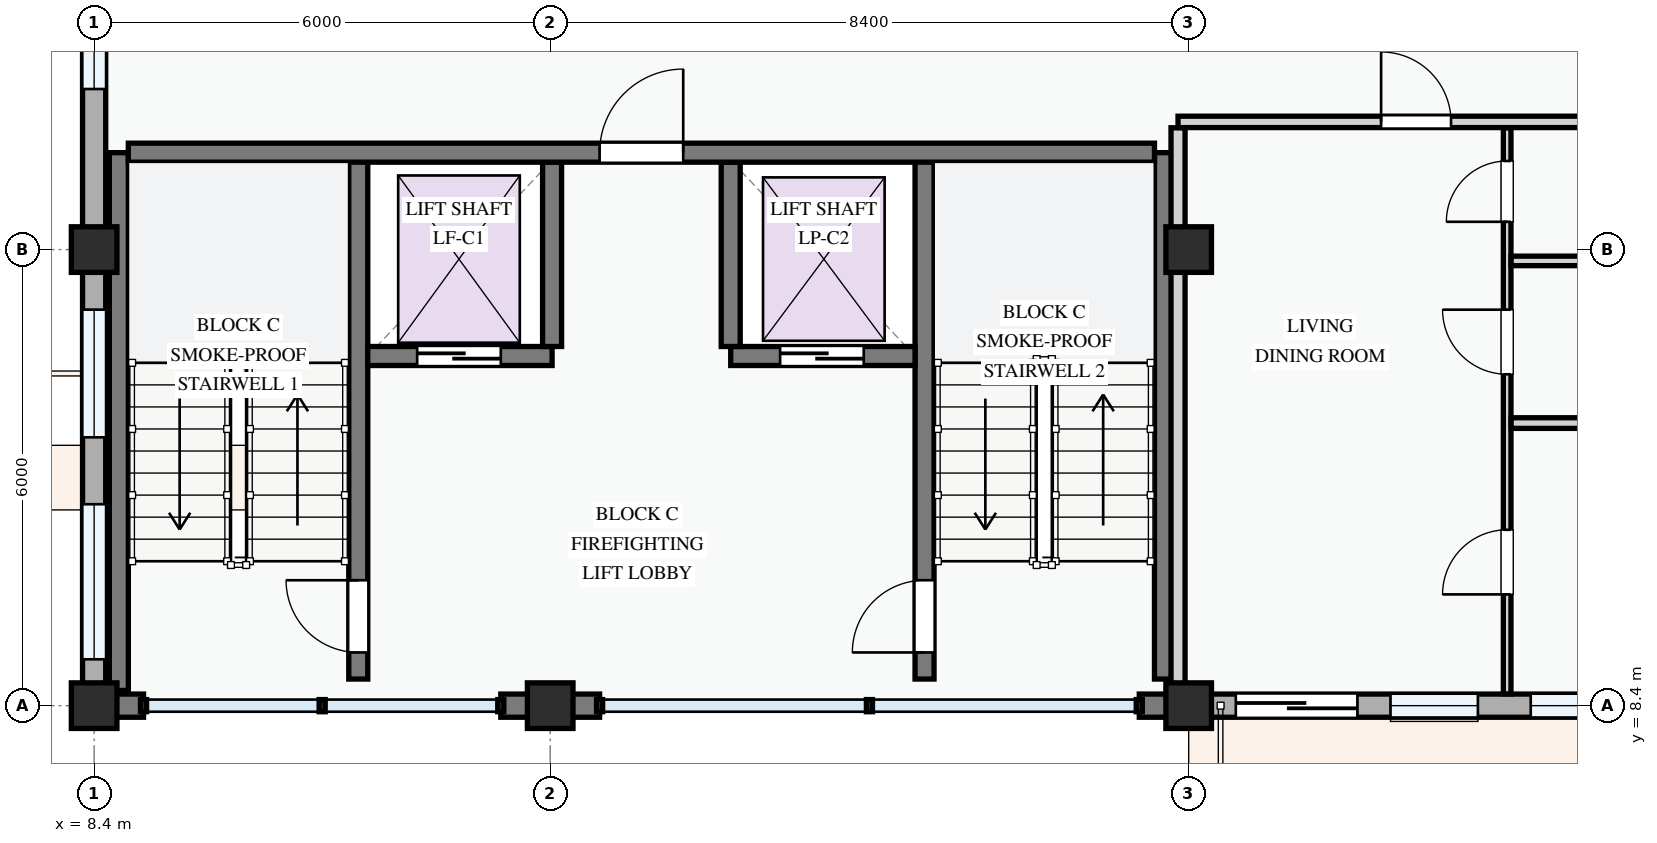
"""IFC4 building model, lengths in metres.
Left out: names, types, materials, properties, quantities, classifications, styles, units other than length and angle.
Written with IfcOpenShell. Run it as: python <this file> out.ifc"""

import sys

from ifc_helpers import new_model, si_unit, direction, frame, frame_2d, origin, origin_2d, place, context, subcontext, project, spatial, rectangle, extrude, element, fill, save


model = new_model("IFC4")
c1 = context("Model", 3, precision=1e-05, world=origin(), true_north=direction((0.0, 1.0)))
c2 = subcontext(c1, "Body", "Model", "MODEL_VIEW")
j1 = project(units=[si_unit("LENGTHUNIT", "METRE"), si_unit("PLANEANGLEUNIT", "RADIAN")], contexts=[c1])
p1 = place(None, origin())
s1 = spatial("IfcSite", under=j1, at=p1, CompositionType="ELEMENT")
p2 = place(p1, origin())
s2 = spatial("IfcBuilding", under=s1, at=p2, CompositionType="ELEMENT")
p3 = place(p2, frame((0.0, 0.0, 18.0)))
s3 = spatial("IfcBuildingStorey", under=s2, at=p3, CompositionType="ELEMENT", Elevation=18.0)
for number, where, z_axis, x_axis in (
    (1, (8.4, 8.4, 0.0), (0.0, 0.0, 1.0), (1.0, 0.0, 0.0)),
    (2, (8.4, 14.4, 0.0), (0.0, 0.0, 1.0), (1.0, 0.0, 0.0)),
    (3, (14.4, 8.4, 0.0), (0.0, 0.0, 1.0), (1.0, 0.0, 0.0)),
    (4, (22.8, 8.4, 0.0), (0.0, 0.0, 1.0), (1.0, 0.0, 0.0)),
    (5, (22.8, 14.4, 0.0), (0.0, 0.0, 1.0), (1.0, 0.0, 0.0)),
):
    element("IfcColumn", number, at=place(p3, frame(where, z_axis=z_axis, x_axis=x_axis)), inside=s3, PredefinedType="COLUMN", context=c2, shape_type="SweptSolid", body=[
        extrude(rectangle(XDim=0.6, YDim=0.6, at=origin_2d()), origin(), (0.0, 0.0, 1.0), 3.3),
    ])
p4 = place(p3, frame((8.4, 22.8, 0.0), z_axis=(0.0, 0.0, 1.0), x_axis=(0.0, -1.0, 0.0)))
e6 = element("IfcWall", 6, at=p4, inside=s3, PredefinedType="STANDARD", context=c2, shape_type="SweptSolid", body=[
    extrude(rectangle(XDim=8.4, YDim=0.305, at=frame_2d((4.2, 0.0))), origin(), (0.0, 0.0, 1.0), 2.425),
])
p5 = place(p4, frame((1.305, 0.0, 0.78)))
e7 = element("IfcOpeningElement", 7, at=p5, cuts=e6, PredefinedType="OPENING", context=c2, shape_type="SweptSolid", body=[
    extrude(rectangle(XDim=1.78, YDim=1.42, at=frame_2d((0.89, 0.71))), frame((0.0, 0.163, 0.0), z_axis=(0.0, -1.0, 0.0), x_axis=(1.0, 0.0, 0.0)), (0.0, 0.0, 1.0), 0.325),
])
p6 = place(p4, frame((5.038, 0.0, 0.78)))
e8 = element("IfcOpeningElement", 8, at=p6, cuts=e6, PredefinedType="OPENING", context=c2, shape_type="SweptSolid", body=[
    extrude(rectangle(XDim=1.25, YDim=1.45, at=frame_2d((0.625, 0.725))), frame((0.0, 0.163, 0.0), z_axis=(0.0, -1.0, 0.0), x_axis=(1.0, 0.0, 0.0)), (0.0, 0.0, 1.0), 0.325),
])
p7 = place(p3, frame((8.4, 14.4, 0.0), z_axis=(0.0, 0.0, 1.0), x_axis=(0.0, -1.0, 0.0)))
e9 = element("IfcWall", 9, at=p7, inside=s3, PredefinedType="STANDARD", context=c2, shape_type="SweptSolid", body=[
    extrude(rectangle(XDim=6.0, YDim=0.305, at=frame_2d((3.0, 0.0))), origin(), (0.0, 0.0, 1.0), 2.575),
])
p8 = place(p7, frame((0.79, 0.0, 0.78)))
e10 = element("IfcOpeningElement", 10, at=p8, cuts=e9, PredefinedType="OPENING", context=c2, shape_type="SweptSolid", body=[
    extrude(rectangle(XDim=1.68, YDim=1.46, at=frame_2d((0.84, 0.73))), frame((0.0, 0.163, 0.0), z_axis=(0.0, -1.0, 0.0), x_axis=(1.0, 0.0, 0.0)), (0.0, 0.0, 1.0), 0.325),
])
p9 = place(p7, frame((3.35, 0.0, 0.78)))
e11 = element("IfcOpeningElement", 11, at=p9, cuts=e9, PredefinedType="OPENING", context=c2, shape_type="SweptSolid", body=[
    extrude(rectangle(XDim=2.04, YDim=1.46, at=frame_2d((1.02, 0.73))), frame((0.0, 0.163, 0.0), z_axis=(0.0, -1.0, 0.0), x_axis=(1.0, 0.0, 0.0)), (0.0, 0.0, 1.0), 0.325),
])
p10 = place(p3, frame((8.554, 8.4, 0.0), z_axis=(0.0, 0.0, 1.0), x_axis=(1.0, 0.0, 0.0)))
e12 = element("IfcWall", 12, at=p10, inside=s3, PredefinedType="STANDARD", context=c2, shape_type="SweptSolid", body=[
    extrude(rectangle(XDim=0.496, YDim=0.305, at=frame_2d((0.248, 0.0))), origin(), (0.0, 0.0, 1.0), 3.04),
])
p11 = place(p3, frame((13.75, 8.4, 0.0), z_axis=(0.0, 0.0, 1.0), x_axis=(1.0, 0.0, 0.0)))
e13 = element("IfcWall", 13, at=p11, inside=s3, PredefinedType="STANDARD", context=c2, shape_type="SweptSolid", body=[
    extrude(rectangle(XDim=0.65, YDim=0.305, at=frame_2d((0.325, 0.0))), origin(), (0.0, 0.0, 1.0), 3.04),
])
for number, where, z_axis, x_axis in (
    (14, (14.4, 8.4, 0.0), (0.0, 0.0, 1.0), (1.0, 0.0, 0.0)),
    (15, (22.15, 8.4, 0.0), (0.0, 0.0, 1.0), (1.0, 0.0, 0.0)),
):
    element("IfcWall", number, at=place(p3, frame(where, z_axis=z_axis, x_axis=x_axis)), inside=s3, PredefinedType="STANDARD", context=c2, shape_type="SweptSolid", body=[
        extrude(rectangle(XDim=0.65, YDim=0.305, at=frame_2d((0.325, 0.0))), origin(), (0.0, 0.0, 1.0), 3.04),
    ])
p12 = place(p3, frame((22.8, 8.4, 0.0), z_axis=(0.0, 0.0, 1.0), x_axis=(1.0, 0.0, 0.0)))
e16 = element("IfcWall", 16, at=p12, inside=s3, PredefinedType="STANDARD", context=c2, shape_type="SweptSolid", body=[
    extrude(rectangle(XDim=6.0, YDim=0.305, at=frame_2d((3.0, 0.0))), origin(), (0.0, 0.0, 1.0), 2.475),
])
p13 = place(p12, frame((0.62, 0.0, 0.0)))
e17 = element("IfcOpeningElement", 17, at=p13, cuts=e16, PredefinedType="OPENING", context=c2, shape_type="SweptSolid", body=[
    extrude(rectangle(XDim=1.6, YDim=2.2, at=frame_2d((0.8, 1.1))), frame((0.0, 0.163, 0.0), z_axis=(0.0, -1.0, 0.0), x_axis=(1.0, 0.0, 0.0)), (0.0, 0.0, 1.0), 0.325),
])
p14 = place(p12, frame((2.655, 0.0, 0.78)))
e18 = element("IfcOpeningElement", 18, at=p14, cuts=e16, PredefinedType="OPENING", context=c2, shape_type="SweptSolid", body=[
    extrude(rectangle(XDim=1.15, YDim=1.25, at=frame_2d((0.575, 0.625))), frame((0.0, 0.163, 0.0), z_axis=(0.0, -1.0, 0.0), x_axis=(1.0, 0.0, 0.0)), (0.0, 0.0, 1.0), 0.325),
])
p15 = place(p12, frame((4.5, 0.0, 0.78)))
e19 = element("IfcOpeningElement", 19, at=p15, cuts=e16, PredefinedType="OPENING", context=c2, shape_type="SweptSolid", body=[
    extrude(rectangle(XDim=1.0, YDim=1.25, at=frame_2d((0.5, 0.625))), frame((0.0, 0.163, 0.0), z_axis=(0.0, -1.0, 0.0), x_axis=(1.0, 0.0, 0.0)), (0.0, 0.0, 1.0), 0.325),
])
p16 = place(p3, frame((11.875, 8.75, 0.0), z_axis=(0.0, 0.0, 1.0), x_axis=(0.0, 1.0, 0.0)))
e20 = element("IfcWall", 20, at=p16, inside=s3, PredefinedType="SHEAR", context=c2, shape_type="SweptSolid", body=[
    extrude(rectangle(XDim=6.925, YDim=0.25, at=frame_2d((3.462, 0.0))), origin(), (0.0, 0.0, 1.0), 3.0),
])
p17 = place(p16, frame((0.35, 0.0, 0.0)))
e21 = element("IfcOpeningElement", 21, at=p17, cuts=e20, PredefinedType="OPENING", context=c2, shape_type="SweptSolid", body=[
    extrude(rectangle(XDim=0.95, YDim=2.1, at=frame_2d((0.475, 1.05))), frame((0.0, 0.135, 0.0), z_axis=(0.0, -1.0, 0.0), x_axis=(1.0, 0.0, 0.0)), (0.0, 0.0, 1.0), 0.27),
])
p18 = place(p3, frame((8.725, 8.6, 0.0), z_axis=(0.0, 0.0, 1.0), x_axis=(0.0, 1.0, 0.0)))
e22 = element("IfcWall", 22, at=p18, inside=s3, PredefinedType="SHEAR", context=c2, shape_type="SweptSolid", body=[
    extrude(rectangle(XDim=7.075, YDim=0.25, at=frame_2d((3.538, 0.0))), origin(), (0.0, 0.0, 1.0), 3.0),
])
p19 = place(p3, frame((22.475, 8.75, 0.0), z_axis=(0.0, 0.0, 1.0), x_axis=(0.0, 1.0, 0.0)))
e23 = element("IfcWall", 23, at=p19, inside=s3, PredefinedType="SHEAR", context=c2, shape_type="SweptSolid", body=[
    extrude(rectangle(XDim=6.925, YDim=0.25, at=frame_2d((3.462, 0.0))), origin(), (0.0, 0.0, 1.0), 3.0),
])
p20 = place(p3, frame((19.325, 8.75, 0.0), z_axis=(0.0, 0.0, 1.0), x_axis=(0.0, 1.0, 0.0)))
e24 = element("IfcWall", 24, at=p20, inside=s3, PredefinedType="SHEAR", context=c2, shape_type="SweptSolid", body=[
    extrude(rectangle(XDim=6.925, YDim=0.25, at=frame_2d((3.462, 0.0))), origin(), (0.0, 0.0, 1.0), 3.0),
])
p21 = place(p20, frame((0.35, 0.0, 0.0)))
e25 = element("IfcOpeningElement", 25, at=p21, cuts=e24, PredefinedType="OPENING", context=c2, shape_type="SweptSolid", body=[
    extrude(rectangle(XDim=0.95, YDim=2.1, at=frame_2d((0.475, 1.05))), frame((0.0, 0.135, 0.0), z_axis=(0.0, -1.0, 0.0), x_axis=(1.0, 0.0, 0.0)), (0.0, 0.0, 1.0), 0.27),
])
p22 = place(p3, frame((12.0, 13.0, 0.0), z_axis=(0.0, 0.0, 1.0), x_axis=(1.0, 0.0, 0.0)))
e26 = element("IfcWall", 26, at=p22, inside=s3, PredefinedType="SHEAR", context=c2, shape_type="SweptSolid", body=[
    extrude(rectangle(XDim=2.425, YDim=0.25, at=frame_2d((1.212, 0.0))), origin(), (0.0, 0.0, 1.0), 3.0),
])
p23 = place(p22, frame((0.65, 0.0, 0.0)))
e27 = element("IfcOpeningElement", 27, at=p23, cuts=e26, PredefinedType="OPENING", context=c2, shape_type="SweptSolid", body=[
    extrude(rectangle(XDim=1.1, YDim=2.15, at=frame_2d((0.55, 1.075))), frame((0.0, 0.135, 0.0), z_axis=(0.0, -1.0, 0.0), x_axis=(1.0, 0.0, 0.0)), (0.0, 0.0, 1.0), 0.27),
])
p24 = place(p3, frame((16.775, 13.0, 0.0), z_axis=(0.0, 0.0, 1.0), x_axis=(1.0, 0.0, 0.0)))
e28 = element("IfcWall", 28, at=p24, inside=s3, PredefinedType="SHEAR", context=c2, shape_type="SweptSolid", body=[
    extrude(rectangle(XDim=2.425, YDim=0.25, at=frame_2d((1.212, 0.0))), origin(), (0.0, 0.0, 1.0), 3.0),
])
p25 = place(p24, frame((0.65, 0.0, 0.0)))
e29 = element("IfcOpeningElement", 29, at=p25, cuts=e28, PredefinedType="OPENING", context=c2, shape_type="SweptSolid", body=[
    extrude(rectangle(XDim=1.1, YDim=2.15, at=frame_2d((0.55, 1.075))), frame((0.0, 0.135, 0.0), z_axis=(0.0, -1.0, 0.0), x_axis=(1.0, 0.0, 0.0)), (0.0, 0.0, 1.0), 0.27),
])
for number, where, z_axis, x_axis in (
    (30, (14.425, 13.125, 0.0), (0.0, 0.0, 1.0), (0.0, 1.0, 0.0)),
    (31, (16.775, 13.125, 0.0), (0.0, 0.0, 1.0), (0.0, 1.0, 0.0)),
):
    element("IfcWall", number, at=place(p3, frame(where, z_axis=z_axis, x_axis=x_axis)), inside=s3, PredefinedType="SHEAR", context=c2, shape_type="SweptSolid", body=[
        extrude(rectangle(XDim=2.425, YDim=0.25, at=frame_2d((1.212, 0.0))), origin(), (0.0, 0.0, 1.0), 3.0),
    ])
p26 = place(p3, frame((8.85, 15.675, 0.0), z_axis=(0.0, 0.0, 1.0), x_axis=(1.0, 0.0, 0.0)))
e32 = element("IfcWall", 32, at=p26, inside=s3, PredefinedType="SHEAR", context=c2, shape_type="SweptSolid", body=[
    extrude(rectangle(XDim=13.5, YDim=0.25, at=frame_2d((6.75, 0.0))), origin(), (0.0, 0.0, 1.0), 3.0),
])
p27 = place(p26, frame((6.2, 0.0, 0.0)))
e33 = element("IfcOpeningElement", 33, at=p27, cuts=e32, PredefinedType="OPENING", context=c2, shape_type="SweptSolid", body=[
    extrude(rectangle(XDim=1.1, YDim=2.15, at=frame_2d((0.55, 1.075))), frame((0.0, 0.135, 0.0), z_axis=(0.0, -1.0, 0.0), x_axis=(1.0, 0.0, 0.0)), (0.0, 0.0, 1.0), 0.27),
])
p28 = place(p3, frame((26.99, 8.554, 0.0), z_axis=(0.0, 0.0, 1.0), x_axis=(0.0, 1.0, 0.0)))
e34 = element("IfcWall", 34, at=p28, inside=s3, PredefinedType="PARTITIONING", context=c2, shape_type="SweptSolid", body=[
    extrude(rectangle(XDim=7.448, YDim=0.1, at=frame_2d((3.724, 0.0))), origin(), (0.0, 0.0, 1.0), 3.0),
])
p29 = place(p28, frame((1.309, 0.0, 0.0)))
e35 = element("IfcOpeningElement", 35, at=p29, cuts=e34, PredefinedType="OPENING", context=c2, shape_type="SweptSolid", body=[
    extrude(rectangle(XDim=0.85, YDim=2.1, at=frame_2d((0.425, 1.05))), frame((0.0, 0.06, 0.0), z_axis=(0.0, -1.0, 0.0), x_axis=(1.0, 0.0, 0.0)), (0.0, 0.0, 1.0), 0.12),
])
p30 = place(p28, frame((4.205, 0.0, 0.0)))
e36 = element("IfcOpeningElement", 36, at=p30, cuts=e34, PredefinedType="OPENING", context=c2, shape_type="SweptSolid", body=[
    extrude(rectangle(XDim=0.85, YDim=2.1, at=frame_2d((0.425, 1.05))), frame((0.0, 0.06, 0.0), z_axis=(0.0, -1.0, 0.0), x_axis=(1.0, 0.0, 0.0)), (0.0, 0.0, 1.0), 0.12),
])
p31 = place(p28, frame((6.211, 0.0, 0.0)))
e37 = element("IfcOpeningElement", 37, at=p31, cuts=e34, PredefinedType="OPENING", context=c2, shape_type="SweptSolid", body=[
    extrude(rectangle(XDim=0.8, YDim=2.1, at=frame_2d((0.4, 1.05))), frame((0.0, 0.06, 0.0), z_axis=(0.0, -1.0, 0.0), x_axis=(1.0, 0.0, 0.0)), (0.0, 0.0, 1.0), 0.12),
])
p32 = place(p3, frame((27.042, 12.118, 0.0), z_axis=(0.0, 0.0, 1.0), x_axis=(1.0, 0.0, 0.0)))
e38 = element("IfcWall", 38, at=p32, inside=s3, PredefinedType="PARTITIONING", context=c2, shape_type="SweptSolid", body=[
    extrude(rectangle(XDim=5.966, YDim=0.14, at=frame_2d((2.983, 0.0))), origin(), (0.0, 0.0, 1.0), 3.0),
])
p33 = place(p3, frame((27.042, 14.251, 0.0), z_axis=(0.0, 0.0, 1.0), x_axis=(1.0, 0.0, 0.0)))
e39 = element("IfcWall", 39, at=p33, inside=s3, PredefinedType="PARTITIONING", context=c2, shape_type="SweptSolid", body=[
    extrude(rectangle(XDim=5.966, YDim=0.125, at=frame_2d((2.983, 0.0))), origin(), (0.0, 0.0, 1.0), 2.375),
])
p34 = place(p3, frame((22.66, 8.554, 0.0), z_axis=(0.0, 0.0, 1.0), x_axis=(0.0, 1.0, 0.0)))
e40 = element("IfcWall", 40, at=p34, inside=s3, PredefinedType="PARTITIONING", context=c2, shape_type="SweptSolid", body=[
    extrude(rectangle(XDim=7.448, YDim=0.185, at=frame_2d((3.724, 0.0))), origin(), (0.0, 0.0, 1.0), 2.425),
])
p35 = place(p3, frame((22.66, 16.08, 0.0), z_axis=(0.0, 0.0, 1.0), x_axis=(1.0, 0.0, 0.0)))
e41 = element("IfcWall", 41, at=p35, inside=s3, PredefinedType="PARTITIONING", context=c2, shape_type="SweptSolid", body=[
    extrude(rectangle(XDim=34.88, YDim=0.15, at=frame_2d((17.44, 0.0))), origin(), (0.0, 0.0, 1.0), 3.0),
])
p36 = place(p35, frame((2.672, 0.0, 0.0)))
e42 = element("IfcOpeningElement", 42, at=p36, cuts=e41, PredefinedType="OPENING", context=c2, shape_type="SweptSolid", body=[
    extrude(rectangle(XDim=0.92, YDim=2.1, at=frame_2d((0.46, 1.05))), frame((0.0, 0.085, 0.0), z_axis=(0.0, -1.0, 0.0), x_axis=(1.0, 0.0, 0.0)), (0.0, 0.0, 1.0), 0.17),
])
p37 = place(p35, frame((10.71, 0.0, 0.0)))
e43 = element("IfcOpeningElement", 43, at=p37, cuts=e41, PredefinedType="OPENING", context=c2, shape_type="SweptSolid", body=[
    extrude(rectangle(XDim=0.92, YDim=2.1, at=frame_2d((0.46, 1.05))), frame((0.0, 0.085, 0.0), z_axis=(0.0, -1.0, 0.0), x_axis=(1.0, 0.0, 0.0)), (0.0, 0.0, 1.0), 0.17),
])
p38 = place(p35, frame((24.28, 0.0, 0.0)))
e44 = element("IfcOpeningElement", 44, at=p38, cuts=e41, PredefinedType="OPENING", context=c2, shape_type="SweptSolid", body=[
    extrude(rectangle(XDim=0.96, YDim=2.12, at=frame_2d((0.48, 1.06))), frame((0.0, 0.085, 0.0), z_axis=(0.0, -1.0, 0.0), x_axis=(1.0, 0.0, 0.0)), (0.0, 0.0, 1.0), 0.17),
])
p39 = place(p6, origin())
e45 = element("IfcWindow", 45, at=p39, inside=s3, PartitioningType="SINGLE_PANEL", PredefinedType="WINDOW", context=c2, shape_type="SweptSolid", body=[
    extrude(rectangle(XDim=1.25, YDim=1.45, at=frame_2d((0.625, 0.725))), frame((0.0, 0.03, 0.0), z_axis=(0.0, -1.0, 0.0), x_axis=(1.0, 0.0, 0.0)), (0.0, 0.0, 1.0), 0.06),
])
fill(e8, e45)
p40 = place(p8, origin())
e46 = element("IfcWindow", 46, at=p40, inside=s3, PartitioningType="DOUBLE_PANEL_VERTICAL", PredefinedType="WINDOW", context=c2, shape_type="SweptSolid", body=[
    extrude(rectangle(XDim=1.68, YDim=1.46, at=frame_2d((0.84, 0.73))), frame((0.0, 0.03, 0.0), z_axis=(0.0, -1.0, 0.0), x_axis=(1.0, 0.0, 0.0)), (0.0, 0.0, 1.0), 0.06),
])
fill(e10, e46)
p41 = place(p9, origin())
e47 = element("IfcWindow", 47, at=p41, inside=s3, PartitioningType="DOUBLE_PANEL_VERTICAL", PredefinedType="WINDOW", context=c2, shape_type="SweptSolid", body=[
    extrude(rectangle(XDim=2.04, YDim=1.46, at=frame_2d((1.02, 0.73))), frame((0.0, 0.03, 0.0), z_axis=(0.0, -1.0, 0.0), x_axis=(1.0, 0.0, 0.0)), (0.0, 0.0, 1.0), 0.06),
])
fill(e11, e47)
p42 = place(p13, frame((1.6, 0.0, 0.0), z_axis=(0.0, 0.0, 1.0), x_axis=(-1.0, 0.0, 0.0)))
e48 = element("IfcDoor", 48, at=p42, inside=s3, OperationType="SLIDING_TO_LEFT", PredefinedType="DOOR", context=c2, shape_type="SweptSolid", body=[
    extrude(rectangle(XDim=1.6, YDim=2.2, at=frame_2d((0.8, 1.1))), frame((0.0, 0.025, 0.0), z_axis=(0.0, -1.0, 0.0), x_axis=(1.0, 0.0, 0.0)), (0.0, 0.0, 1.0), 0.05),
])
fill(e17, e48)
p43 = place(p14, origin())
e49 = element("IfcWindow", 49, at=p43, inside=s3, PartitioningType="SINGLE_PANEL", PredefinedType="WINDOW", context=c2, shape_type="SweptSolid", body=[
    extrude(rectangle(XDim=1.15, YDim=1.25, at=frame_2d((0.575, 0.625))), frame((0.0, 0.03, 0.0), z_axis=(0.0, -1.0, 0.0), x_axis=(1.0, 0.0, 0.0)), (0.0, 0.0, 1.0), 0.06),
])
fill(e18, e49)
p44 = place(p15, origin())
e50 = element("IfcWindow", 50, at=p44, inside=s3, PartitioningType="SINGLE_PANEL", PredefinedType="WINDOW", context=c2, shape_type="SweptSolid", body=[
    extrude(rectangle(XDim=1.0, YDim=1.25, at=frame_2d((0.5, 0.625))), frame((0.0, 0.03, 0.0), z_axis=(0.0, -1.0, 0.0), x_axis=(1.0, 0.0, 0.0)), (0.0, 0.0, 1.0), 0.06),
])
fill(e19, e50)
p45 = place(p17, origin())
e51 = element("IfcDoor", 51, at=p45, inside=s3, OperationType="SINGLE_SWING_RIGHT", PredefinedType="DOOR", context=c2, shape_type="SweptSolid", body=[
    extrude(rectangle(XDim=0.95, YDim=2.1, at=frame_2d((0.475, 1.05))), frame((0.0, 0.025, 0.0), z_axis=(0.0, -1.0, 0.0), x_axis=(1.0, 0.0, 0.0)), (0.0, 0.0, 1.0), 0.05),
])
fill(e21, e51)
p46 = place(p21, origin())
e52 = element("IfcDoor", 52, at=p46, inside=s3, OperationType="SINGLE_SWING_LEFT", PredefinedType="DOOR", context=c2, shape_type="SweptSolid", body=[
    extrude(rectangle(XDim=0.95, YDim=2.1, at=frame_2d((0.475, 1.05))), frame((0.0, 0.025, 0.0), z_axis=(0.0, -1.0, 0.0), x_axis=(1.0, 0.0, 0.0)), (0.0, 0.0, 1.0), 0.05),
])
fill(e25, e52)
p47 = place(p23, origin())
e53 = element("IfcDoor", 53, at=p47, inside=s3, OperationType="SLIDING_TO_LEFT", PredefinedType="DOOR", context=c2, shape_type="SweptSolid", body=[
    extrude(rectangle(XDim=1.1, YDim=2.15, at=frame_2d((0.55, 1.075))), frame((0.0, 0.025, 0.0), z_axis=(0.0, -1.0, 0.0), x_axis=(1.0, 0.0, 0.0)), (0.0, 0.0, 1.0), 0.05),
])
fill(e27, e53)
p48 = place(p25, origin())
e54 = element("IfcDoor", 54, at=p48, inside=s3, OperationType="SLIDING_TO_LEFT", PredefinedType="DOOR", context=c2, shape_type="SweptSolid", body=[
    extrude(rectangle(XDim=1.1, YDim=2.15, at=frame_2d((0.55, 1.075))), frame((0.0, 0.025, 0.0), z_axis=(0.0, -1.0, 0.0), x_axis=(1.0, 0.0, 0.0)), (0.0, 0.0, 1.0), 0.05),
])
fill(e29, e54)
p49 = place(p27, origin())
e55 = element("IfcDoor", 55, at=p49, inside=s3, OperationType="SINGLE_SWING_RIGHT", PredefinedType="DOOR", context=c2, shape_type="SweptSolid", body=[
    extrude(rectangle(XDim=1.1, YDim=2.15, at=frame_2d((0.55, 1.075))), frame((0.0, 0.025, 0.0), z_axis=(0.0, -1.0, 0.0), x_axis=(1.0, 0.0, 0.0)), (0.0, 0.0, 1.0), 0.05),
])
fill(e33, e55)
p50 = place(p29, origin())
e56 = element("IfcDoor", 56, at=p50, inside=s3, OperationType="SINGLE_SWING_LEFT", PredefinedType="DOOR", context=c2, shape_type="SweptSolid", body=[
    extrude(rectangle(XDim=0.85, YDim=2.1, at=frame_2d((0.425, 1.05))), frame((0.0, 0.025, 0.0), z_axis=(0.0, -1.0, 0.0), x_axis=(1.0, 0.0, 0.0)), (0.0, 0.0, 1.0), 0.05),
])
fill(e35, e56)
p51 = place(p30, origin())
e57 = element("IfcDoor", 57, at=p51, inside=s3, OperationType="SINGLE_SWING_RIGHT", PredefinedType="DOOR", context=c2, shape_type="SweptSolid", body=[
    extrude(rectangle(XDim=0.85, YDim=2.1, at=frame_2d((0.425, 1.05))), frame((0.0, 0.025, 0.0), z_axis=(0.0, -1.0, 0.0), x_axis=(1.0, 0.0, 0.0)), (0.0, 0.0, 1.0), 0.05),
])
fill(e36, e57)
p52 = place(p31, origin())
e58 = element("IfcDoor", 58, at=p52, inside=s3, OperationType="SINGLE_SWING_LEFT", PredefinedType="DOOR", context=c2, shape_type="SweptSolid", body=[
    extrude(rectangle(XDim=0.8, YDim=2.1, at=frame_2d((0.4, 1.05))), frame((0.0, 0.025, 0.0), z_axis=(0.0, -1.0, 0.0), x_axis=(1.0, 0.0, 0.0)), (0.0, 0.0, 1.0), 0.05),
])
fill(e37, e58)
p53 = place(p36, origin())
e59 = element("IfcDoor", 59, at=p53, inside=s3, OperationType="SINGLE_SWING_LEFT", PredefinedType="DOOR", context=c2, shape_type="SweptSolid", body=[
    extrude(rectangle(XDim=0.92, YDim=2.1, at=frame_2d((0.46, 1.05))), frame((0.0, 0.025, 0.0), z_axis=(0.0, -1.0, 0.0), x_axis=(1.0, 0.0, 0.0)), (0.0, 0.0, 1.0), 0.05),
])
fill(e42, e59)
save(model, sys.argv[1])
